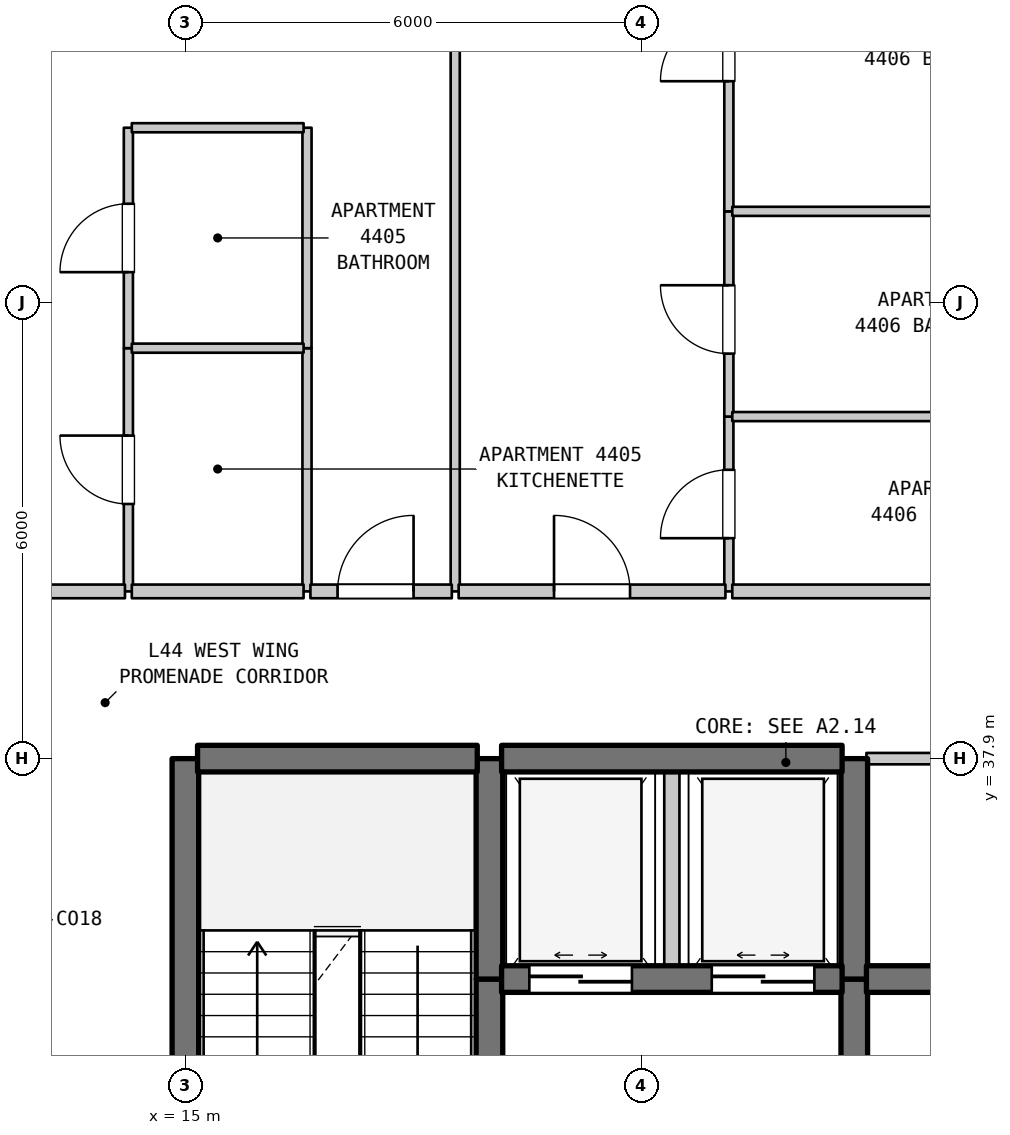
"""IFC4 building model, lengths in metres.
Left out: names, types, materials, properties, quantities, classifications, styles, units other than length and angle.
Written with IfcOpenShell. Run it as: python <this file> out.ifc"""

import sys

from ifc_helpers import new_model, si_unit, direction, frame, frame_2d, origin, place, context, subcontext, project, spatial, rectangle, extrude, element, fill, save


model = new_model("IFC4")
c1 = context("Model", 3, precision=1e-05, world=origin(), true_north=direction((0.0, 1.0)))
c2 = subcontext(c1, "Body", "Model", "MODEL_VIEW")
j1 = project(units=[si_unit("LENGTHUNIT", "METRE"), si_unit("PLANEANGLEUNIT", "RADIAN")], contexts=[c1])
p1 = place(None, origin())
s1 = spatial("IfcSite", under=j1, at=p1, CompositionType="ELEMENT")
p2 = place(p1, origin())
s2 = spatial("IfcBuilding", under=s1, at=p2, CompositionType="ELEMENT")
p3 = place(p2, frame((0.0, 0.0, 180.2)))
s3 = spatial("IfcBuildingStorey", under=s2, at=p3, CompositionType="ELEMENT", Elevation=180.2)
p4 = place(p3, frame((14.25, 40.1, 0.0), z_axis=(0.0, 0.0, 1.0), x_axis=(0.0, 1.0, 0.0)))
e1 = element("IfcWall", 1, at=p4, inside=s3, PredefinedType="PARTITIONING", context=c2, shape_type="SweptSolid", body=[
    extrude(rectangle(XDim=3.2, YDim=0.12, at=frame_2d((1.6, 0.0))), origin(), (0.0, 0.0, 1.0), 3.38),
])
p5 = place(p4, frame((1.15, 0.0, 0.0)))
e2 = element("IfcOpeningElement", 2, at=p5, cuts=e1, PredefinedType="OPENING", context=c2, shape_type="SweptSolid", body=[
    extrude(rectangle(XDim=0.9, YDim=2.15, at=frame_2d((0.45, 1.075))), frame((0.0, 0.07, 0.0), z_axis=(0.0, -1.0, 0.0), x_axis=(1.0, 0.0, 0.0)), (0.0, 0.0, 1.0), 0.14),
])
p6 = place(p3, frame((14.25, 43.3, 0.0), z_axis=(0.0, 0.0, 1.0), x_axis=(0.0, 1.0, 0.0)))
e3 = element("IfcWall", 3, at=p6, inside=s3, PredefinedType="PARTITIONING", context=c2, shape_type="SweptSolid", body=[
    extrude(rectangle(XDim=2.9, YDim=0.12, at=frame_2d((1.45, 0.0))), origin(), (0.0, 0.0, 1.0), 3.38),
])
p7 = place(p6, frame((1.0, 0.0, 0.0)))
e4 = element("IfcOpeningElement", 4, at=p7, cuts=e3, PredefinedType="OPENING", context=c2, shape_type="SweptSolid", body=[
    extrude(rectangle(XDim=0.9, YDim=2.1, at=frame_2d((0.45, 1.05))), frame((0.0, 0.07, 0.0), z_axis=(0.0, -1.0, 0.0), x_axis=(1.0, 0.0, 0.0)), (0.0, 0.0, 1.0), 0.14),
])
p8 = place(p3, frame((15.0, 31.1, 0.0), z_axis=(0.0, 0.0, 1.0), x_axis=(0.0, 1.0, 0.0)))
e5 = element("IfcWall", 5, at=p8, inside=s3, PredefinedType="SHEAR", context=c2, shape_type="SweptSolid", body=[
    extrude(rectangle(XDim=6.8, YDim=0.35, at=frame_2d((3.4, 0.0))), origin(), (0.0, 0.0, 1.0), 3.38),
])
p9 = place(p3, frame((16.6, 40.1, 0.0), z_axis=(0.0, 0.0, 1.0), x_axis=(0.0, 1.0, 0.0)))
e6 = element("IfcWall", 6, at=p9, inside=s3, PredefinedType="PARTITIONING", context=c2, shape_type="SweptSolid", body=[
    extrude(rectangle(XDim=3.2, YDim=0.12, at=frame_2d((1.6, 0.0))), origin(), (0.0, 0.0, 1.0), 3.38),
])
p10 = place(p3, frame((16.6, 43.3, 0.0), z_axis=(0.0, 0.0, 1.0), x_axis=(0.0, 1.0, 0.0)))
e7 = element("IfcWall", 7, at=p10, inside=s3, PredefinedType="PARTITIONING", context=c2, shape_type="SweptSolid", body=[
    extrude(rectangle(XDim=2.9, YDim=0.12, at=frame_2d((1.45, 0.0))), origin(), (0.0, 0.0, 1.0), 3.38),
])
p11 = place(p3, frame((18.55, 40.1, 0.0), z_axis=(0.0, 0.0, 1.0), x_axis=(0.0, 1.0, 0.0)))
e8 = element("IfcWall", 8, at=p11, inside=s3, PredefinedType="PARTITIONING", context=c2, shape_type="SweptSolid", body=[
    extrude(rectangle(XDim=13.79, YDim=0.12, at=frame_2d((6.895, 0.0))), origin(), (0.0, 0.0, 1.0), 3.38),
])
p12 = place(p3, frame((19.0, 29.5, 0.0), z_axis=(0.0, 0.0, 1.0), x_axis=(0.0, 1.0, 0.0)))
e9 = element("IfcWall", 9, at=p12, inside=s3, PredefinedType="SHEAR", context=c2, shape_type="SweptSolid", body=[
    extrude(rectangle(XDim=5.5, YDim=0.35, at=frame_2d((2.75, 0.0))), origin(), (0.0, 0.0, 1.0), 3.38),
])
p13 = place(p12, frame((2.025, 0.0, 0.0)))
e10 = element("IfcOpeningElement", 10, at=p13, cuts=e9, PredefinedType="OPENING", context=c2, shape_type="SweptSolid", body=[
    extrude(rectangle(XDim=1.1, YDim=2.15, at=frame_2d((0.55, 1.075))), frame((0.0, 0.185, 0.0), z_axis=(0.0, -1.0, 0.0), x_axis=(1.0, 0.0, 0.0)), (0.0, 0.0, 1.0), 0.37),
])
p14 = place(p3, frame((19.0, 35.0, 0.0), z_axis=(0.0, 0.0, 1.0), x_axis=(0.0, 1.0, 0.0)))
e11 = element("IfcWall", 11, at=p14, inside=s3, PredefinedType="SHEAR", context=c2, shape_type="SweptSolid", body=[
    extrude(rectangle(XDim=2.9, YDim=0.35, at=frame_2d((1.45, 0.0))), origin(), (0.0, 0.0, 1.0), 3.38),
])
p15 = place(p3, frame((21.4, 35.0, 0.0), z_axis=(0.0, 0.0, 1.0), x_axis=(0.0, 1.0, 0.0)))
e12 = element("IfcWall", 12, at=p15, inside=s3, PredefinedType="STANDARD", context=c2, shape_type="SweptSolid", body=[
    extrude(rectangle(XDim=2.9, YDim=0.2, at=frame_2d((1.45, 0.0))), origin(), (0.0, 0.0, 1.0), 3.38),
])
p16 = place(p3, frame((22.15, 40.1, 0.0), z_axis=(0.0, 0.0, 1.0), x_axis=(0.0, 1.0, 0.0)))
e13 = element("IfcWall", 13, at=p16, inside=s3, PredefinedType="PARTITIONING", context=c2, shape_type="SweptSolid", body=[
    extrude(rectangle(XDim=2.3, YDim=0.12, at=frame_2d((1.15, 0.0))), origin(), (0.0, 0.0, 1.0), 3.38),
])
p17 = place(p16, frame((0.7, 0.0, 0.0)))
e14 = element("IfcOpeningElement", 14, at=p17, cuts=e13, PredefinedType="OPENING", context=c2, shape_type="SweptSolid", body=[
    extrude(rectangle(XDim=0.9, YDim=2.15, at=frame_2d((0.45, 1.075))), frame((0.0, 0.07, 0.0), z_axis=(0.0, -1.0, 0.0), x_axis=(1.0, 0.0, 0.0)), (0.0, 0.0, 1.0), 0.14),
])
p18 = place(p3, frame((22.15, 42.4, 0.0), z_axis=(0.0, 0.0, 1.0), x_axis=(0.0, 1.0, 0.0)))
e15 = element("IfcWall", 15, at=p18, inside=s3, PredefinedType="PARTITIONING", context=c2, shape_type="SweptSolid", body=[
    extrude(rectangle(XDim=2.7, YDim=0.12, at=frame_2d((1.35, 0.0))), origin(), (0.0, 0.0, 1.0), 3.38),
])
p19 = place(p18, frame((0.828, 0.0, 0.0)))
e16 = element("IfcOpeningElement", 16, at=p19, cuts=e15, PredefinedType="OPENING", context=c2, shape_type="SweptSolid", body=[
    extrude(rectangle(XDim=0.9, YDim=2.1, at=frame_2d((0.45, 1.05))), frame((0.0, 0.07, 0.0), z_axis=(0.0, -1.0, 0.0), x_axis=(1.0, 0.0, 0.0)), (0.0, 0.0, 1.0), 0.14),
])
p20 = place(p3, frame((22.15, 45.1, 0.0), z_axis=(0.0, 0.0, 1.0), x_axis=(0.0, 1.0, 0.0)))
e17 = element("IfcWall", 17, at=p20, inside=s3, PredefinedType="PARTITIONING", context=c2, shape_type="SweptSolid", body=[
    extrude(rectangle(XDim=8.79, YDim=0.12, at=frame_2d((4.395, 0.0))), origin(), (0.0, 0.0, 1.0), 3.38),
])
p21 = place(p20, frame((1.712, 0.0, 0.0)))
e18 = element("IfcOpeningElement", 18, at=p21, cuts=e17, PredefinedType="OPENING", context=c2, shape_type="SweptSolid", body=[
    extrude(rectangle(XDim=0.9, YDim=2.15, at=frame_2d((0.45, 1.075))), frame((0.0, 0.07, 0.0), z_axis=(0.0, -1.0, 0.0), x_axis=(1.0, 0.0, 0.0)), (0.0, 0.0, 1.0), 0.14),
])
p22 = place(p20, frame((6.03, 0.0, 0.0)))
e19 = element("IfcOpeningElement", 19, at=p22, cuts=e17, PredefinedType="OPENING", context=c2, shape_type="SweptSolid", body=[
    extrude(rectangle(XDim=0.9, YDim=2.15, at=frame_2d((0.45, 1.075))), frame((0.0, 0.07, 0.0), z_axis=(0.0, -1.0, 0.0), x_axis=(1.0, 0.0, 0.0)), (0.0, 0.0, 1.0), 0.14),
])
p23 = place(p3, frame((23.8, 31.5, 0.0), z_axis=(0.0, 0.0, 1.0), x_axis=(0.0, 1.0, 0.0)))
e20 = element("IfcWall", 20, at=p23, inside=s3, PredefinedType="SHEAR", context=c2, shape_type="SweptSolid", body=[
    extrude(rectangle(XDim=3.5, YDim=0.35, at=frame_2d((1.75, 0.0))), origin(), (0.0, 0.0, 1.0), 3.38),
])
p24 = place(p23, frame((1.127, 0.0, 0.0)))
e21 = element("IfcOpeningElement", 21, at=p24, cuts=e20, PredefinedType="OPENING", context=c2, shape_type="SweptSolid", body=[
    extrude(rectangle(XDim=1.1, YDim=2.15, at=frame_2d((0.55, 1.075))), frame((0.0, 0.185, 0.0), z_axis=(0.0, -1.0, 0.0), x_axis=(1.0, 0.0, 0.0)), (0.0, 0.0, 1.0), 0.37),
])
p25 = place(p3, frame((23.8, 35.0, 0.0), z_axis=(0.0, 0.0, 1.0), x_axis=(0.0, 1.0, 0.0)))
e22 = element("IfcWall", 22, at=p25, inside=s3, PredefinedType="SHEAR", context=c2, shape_type="SweptSolid", body=[
    extrude(rectangle(XDim=2.9, YDim=0.35, at=frame_2d((1.45, 0.0))), origin(), (0.0, 0.0, 1.0), 3.38),
])
p26 = place(p3, frame((19.16, 35.0, 0.0), z_axis=(0.0, 0.0, 1.0), x_axis=(1.0, 0.0, 0.0)))
e23 = element("IfcWall", 23, at=p26, inside=s3, PredefinedType="SHEAR", context=c2, shape_type="SweptSolid", body=[
    extrude(rectangle(XDim=4.48, YDim=0.35, at=frame_2d((2.24, 0.0))), origin(), (0.0, 0.0, 1.0), 3.38),
])
p27 = place(p26, frame((0.365, 0.0, 0.0)))
e24 = element("IfcOpeningElement", 24, at=p27, cuts=e23, PredefinedType="OPENING", context=c2, shape_type="SweptSolid", body=[
    extrude(rectangle(XDim=1.35, YDim=2.2, at=frame_2d((0.675, 1.1))), frame((0.0, 0.185, 0.0), z_axis=(0.0, -1.0, 0.0), x_axis=(1.0, 0.0, 0.0)), (0.0, 0.0, 1.0), 0.37),
])
p28 = place(p26, frame((2.765, 0.0, 0.0)))
e25 = element("IfcOpeningElement", 25, at=p28, cuts=e23, PredefinedType="OPENING", context=c2, shape_type="SweptSolid", body=[
    extrude(rectangle(XDim=1.35, YDim=2.2, at=frame_2d((0.675, 1.1))), frame((0.0, 0.185, 0.0), z_axis=(0.0, -1.0, 0.0), x_axis=(1.0, 0.0, 0.0)), (0.0, 0.0, 1.0), 0.37),
])
p29 = place(p3, frame((23.96, 35.0, 0.0), z_axis=(0.0, 0.0, 1.0), x_axis=(1.0, 0.0, 0.0)))
e26 = element("IfcWall", 26, at=p29, inside=s3, PredefinedType="SHEAR", context=c2, shape_type="SweptSolid", body=[
    extrude(rectangle(XDim=3.995, YDim=0.35, at=frame_2d((1.998, 0.0))), origin(), (0.0, 0.0, 1.0), 3.38),
])
p30 = place(p29, frame((1.393, 0.0, 0.0)))
e27 = element("IfcOpeningElement", 27, at=p30, cuts=e26, PredefinedType="OPENING", context=c2, shape_type="SweptSolid", body=[
    extrude(rectangle(XDim=0.95, YDim=2.15, at=frame_2d((0.475, 1.075))), frame((0.0, 0.185, 0.0), z_axis=(0.0, -1.0, 0.0), x_axis=(1.0, 0.0, 0.0)), (0.0, 0.0, 1.0), 0.37),
])
p31 = place(p3, frame((15.16, 37.9, 0.0), z_axis=(0.0, 0.0, 1.0), x_axis=(1.0, 0.0, 0.0)))
e28 = element("IfcWall", 28, at=p31, inside=s3, PredefinedType="SHEAR", context=c2, shape_type="SweptSolid", body=[
    extrude(rectangle(XDim=3.68, YDim=0.35, at=frame_2d((1.84, 0.0))), origin(), (0.0, 0.0, 1.0), 3.38),
])
p32 = place(p3, frame((19.16, 37.9, 0.0), z_axis=(0.0, 0.0, 1.0), x_axis=(1.0, 0.0, 0.0)))
e29 = element("IfcWall", 29, at=p32, inside=s3, PredefinedType="SHEAR", context=c2, shape_type="SweptSolid", body=[
    extrude(rectangle(XDim=4.48, YDim=0.35, at=frame_2d((2.24, 0.0))), origin(), (0.0, 0.0, 1.0), 3.38),
])
p33 = place(p3, frame((23.96, 37.9, 0.0), z_axis=(0.0, 0.0, 1.0), x_axis=(1.0, 0.0, 0.0)))
e30 = element("IfcWall", 30, at=p33, inside=s3, PredefinedType="STANDARD", context=c2, shape_type="SweptSolid", body=[
    extrude(rectangle(XDim=3.995, YDim=0.15, at=frame_2d((1.998, 0.0))), origin(), (0.0, 0.0, 1.0), 2.88),
])
p34 = place(p3, frame((12.875, 40.1, 0.0), z_axis=(0.0, 0.0, 1.0), x_axis=(1.0, 0.0, 0.0)))
e31 = element("IfcWall", 31, at=p34, inside=s3, PredefinedType="STANDARD", context=c2, shape_type="SweptSolid", body=[
    extrude(rectangle(XDim=1.33, YDim=0.18, at=frame_2d((0.665, 0.0))), origin(), (0.0, 0.0, 1.0), 3.38),
])
p35 = place(p3, frame((14.295, 40.1, 0.0), z_axis=(0.0, 0.0, 1.0), x_axis=(1.0, 0.0, 0.0)))
e32 = element("IfcWall", 32, at=p35, inside=s3, PredefinedType="STANDARD", context=c2, shape_type="SweptSolid", body=[
    extrude(rectangle(XDim=2.26, YDim=0.18, at=frame_2d((1.13, 0.0))), origin(), (0.0, 0.0, 1.0), 3.38),
])
p36 = place(p3, frame((16.645, 40.1, 0.0), z_axis=(0.0, 0.0, 1.0), x_axis=(1.0, 0.0, 0.0)))
e33 = element("IfcWall", 33, at=p36, inside=s3, PredefinedType="STANDARD", context=c2, shape_type="SweptSolid", body=[
    extrude(rectangle(XDim=1.86, YDim=0.18, at=frame_2d((0.93, 0.0))), origin(), (0.0, 0.0, 1.0), 3.38),
])
p37 = place(p36, frame((0.357, 0.0, 0.0)))
e34 = element("IfcOpeningElement", 34, at=p37, cuts=e33, PredefinedType="OPENING", context=c2, shape_type="SweptSolid", body=[
    extrude(rectangle(XDim=1.0, YDim=2.15, at=frame_2d((0.5, 1.075))), frame((0.0, 0.1, 0.0), z_axis=(0.0, -1.0, 0.0), x_axis=(1.0, 0.0, 0.0)), (0.0, 0.0, 1.0), 0.2),
])
p38 = place(p3, frame((18.595, 40.1, 0.0), z_axis=(0.0, 0.0, 1.0), x_axis=(1.0, 0.0, 0.0)))
e35 = element("IfcWall", 35, at=p38, inside=s3, PredefinedType="STANDARD", context=c2, shape_type="SweptSolid", body=[
    extrude(rectangle(XDim=3.51, YDim=0.18, at=frame_2d((1.755, 0.0))), origin(), (0.0, 0.0, 1.0), 3.38),
])
p39 = place(p38, frame((1.255, 0.0, 0.0)))
e36 = element("IfcOpeningElement", 36, at=p39, cuts=e35, PredefinedType="OPENING", context=c2, shape_type="SweptSolid", body=[
    extrude(rectangle(XDim=1.0, YDim=2.15, at=frame_2d((0.5, 1.075))), frame((0.0, 0.1, 0.0), z_axis=(0.0, -1.0, 0.0), x_axis=(1.0, 0.0, 0.0)), (0.0, 0.0, 1.0), 0.2),
])
p40 = place(p3, frame((22.195, 40.1, 0.0), z_axis=(0.0, 0.0, 1.0), x_axis=(1.0, 0.0, 0.0)))
e37 = element("IfcWall", 37, at=p40, inside=s3, PredefinedType="STANDARD", context=c2, shape_type="SweptSolid", body=[
    extrude(rectangle(XDim=4.99, YDim=0.18, at=frame_2d((2.495, 0.0))), origin(), (0.0, 0.0, 1.0), 3.38),
])
p41 = place(p3, frame((22.195, 42.4, 0.0), z_axis=(0.0, 0.0, 1.0), x_axis=(1.0, 0.0, 0.0)))
e38 = element("IfcWall", 38, at=p41, inside=s3, PredefinedType="PARTITIONING", context=c2, shape_type="SweptSolid", body=[
    extrude(rectangle(XDim=4.99, YDim=0.12, at=frame_2d((2.495, 0.0))), origin(), (0.0, 0.0, 1.0), 3.38),
])
p42 = place(p3, frame((14.295, 43.3, 0.0), z_axis=(0.0, 0.0, 1.0), x_axis=(1.0, 0.0, 0.0)))
e39 = element("IfcWall", 39, at=p42, inside=s3, PredefinedType="PARTITIONING", context=c2, shape_type="SweptSolid", body=[
    extrude(rectangle(XDim=2.26, YDim=0.12, at=frame_2d((1.13, 0.0))), origin(), (0.0, 0.0, 1.0), 3.38),
])
p43 = place(p3, frame((22.195, 45.1, 0.0), z_axis=(0.0, 0.0, 1.0), x_axis=(1.0, 0.0, 0.0)))
e40 = element("IfcWall", 40, at=p43, inside=s3, PredefinedType="PARTITIONING", context=c2, shape_type="SweptSolid", body=[
    extrude(rectangle(XDim=4.99, YDim=0.12, at=frame_2d((2.495, 0.0))), origin(), (0.0, 0.0, 1.0), 3.38),
])
p44 = place(p3, frame((14.295, 46.2, 0.0), z_axis=(0.0, 0.0, 1.0), x_axis=(1.0, 0.0, 0.0)))
e41 = element("IfcWall", 41, at=p44, inside=s3, PredefinedType="PARTITIONING", context=c2, shape_type="SweptSolid", body=[
    extrude(rectangle(XDim=2.26, YDim=0.12, at=frame_2d((1.13, 0.0))), origin(), (0.0, 0.0, 1.0), 3.38),
])
p45 = place(p5, origin())
e42 = element("IfcDoor", 42, at=p45, inside=s3, OperationType="SINGLE_SWING_RIGHT", PredefinedType="DOOR", context=c2, shape_type="SweptSolid", body=[
    extrude(rectangle(XDim=0.9, YDim=2.15, at=frame_2d((0.45, 1.075))), frame((0.0, 0.025, 0.0), z_axis=(0.0, -1.0, 0.0), x_axis=(1.0, 0.0, 0.0)), (0.0, 0.0, 1.0), 0.05),
])
fill(e2, e42)
p46 = place(p7, origin())
e43 = element("IfcDoor", 43, at=p46, inside=s3, OperationType="SINGLE_SWING_LEFT", PredefinedType="DOOR", context=c2, shape_type="SweptSolid", body=[
    extrude(rectangle(XDim=0.9, YDim=2.1, at=frame_2d((0.45, 1.05))), frame((0.0, 0.025, 0.0), z_axis=(0.0, -1.0, 0.0), x_axis=(1.0, 0.0, 0.0)), (0.0, 0.0, 1.0), 0.05),
])
fill(e4, e43)
p47 = place(p17, origin())
e44 = element("IfcDoor", 44, at=p47, inside=s3, OperationType="SINGLE_SWING_LEFT", PredefinedType="DOOR", context=c2, shape_type="SweptSolid", body=[
    extrude(rectangle(XDim=0.9, YDim=2.15, at=frame_2d((0.45, 1.075))), frame((0.0, 0.025, 0.0), z_axis=(0.0, -1.0, 0.0), x_axis=(1.0, 0.0, 0.0)), (0.0, 0.0, 1.0), 0.05),
])
fill(e14, e44)
p48 = place(p19, origin())
e45 = element("IfcDoor", 45, at=p48, inside=s3, OperationType="SINGLE_SWING_RIGHT", PredefinedType="DOOR", context=c2, shape_type="SweptSolid", body=[
    extrude(rectangle(XDim=0.9, YDim=2.1, at=frame_2d((0.45, 1.05))), frame((0.0, 0.025, 0.0), z_axis=(0.0, -1.0, 0.0), x_axis=(1.0, 0.0, 0.0)), (0.0, 0.0, 1.0), 0.05),
])
fill(e16, e45)
p49 = place(p21, origin())
e46 = element("IfcDoor", 46, at=p49, inside=s3, OperationType="SINGLE_SWING_LEFT", PredefinedType="DOOR", context=c2, shape_type="SweptSolid", body=[
    extrude(rectangle(XDim=0.9, YDim=2.15, at=frame_2d((0.45, 1.075))), frame((0.0, 0.025, 0.0), z_axis=(0.0, -1.0, 0.0), x_axis=(1.0, 0.0, 0.0)), (0.0, 0.0, 1.0), 0.05),
])
fill(e18, e46)
p50 = place(p27, origin())
e47 = element("IfcDoor", 47, at=p50, inside=s3, OperationType="DOUBLE_DOOR_SLIDING", PredefinedType="DOOR", context=c2, shape_type="SweptSolid", body=[
    extrude(rectangle(XDim=1.35, YDim=2.2, at=frame_2d((0.675, 1.1))), frame((0.0, 0.025, 0.0), z_axis=(0.0, -1.0, 0.0), x_axis=(1.0, 0.0, 0.0)), (0.0, 0.0, 1.0), 0.05),
])
fill(e24, e47)
p51 = place(p28, origin())
e48 = element("IfcDoor", 48, at=p51, inside=s3, OperationType="DOUBLE_DOOR_SLIDING", PredefinedType="DOOR", context=c2, shape_type="SweptSolid", body=[
    extrude(rectangle(XDim=1.35, YDim=2.2, at=frame_2d((0.675, 1.1))), frame((0.0, 0.025, 0.0), z_axis=(0.0, -1.0, 0.0), x_axis=(1.0, 0.0, 0.0)), (0.0, 0.0, 1.0), 0.05),
])
fill(e25, e48)
p52 = place(p37, origin())
e49 = element("IfcDoor", 49, at=p52, inside=s3, OperationType="SINGLE_SWING_RIGHT", PredefinedType="DOOR", context=c2, shape_type="SweptSolid", body=[
    extrude(rectangle(XDim=1.0, YDim=2.15, at=frame_2d((0.5, 1.075))), frame((0.0, 0.025, 0.0), z_axis=(0.0, -1.0, 0.0), x_axis=(1.0, 0.0, 0.0)), (0.0, 0.0, 1.0), 0.05),
])
fill(e34, e49)
p53 = place(p39, origin())
e50 = element("IfcDoor", 50, at=p53, inside=s3, OperationType="SINGLE_SWING_LEFT", PredefinedType="DOOR", context=c2, shape_type="SweptSolid", body=[
    extrude(rectangle(XDim=1.0, YDim=2.15, at=frame_2d((0.5, 1.075))), frame((0.0, 0.025, 0.0), z_axis=(0.0, -1.0, 0.0), x_axis=(1.0, 0.0, 0.0)), (0.0, 0.0, 1.0), 0.05),
])
fill(e36, e50)
save(model, sys.argv[1])
